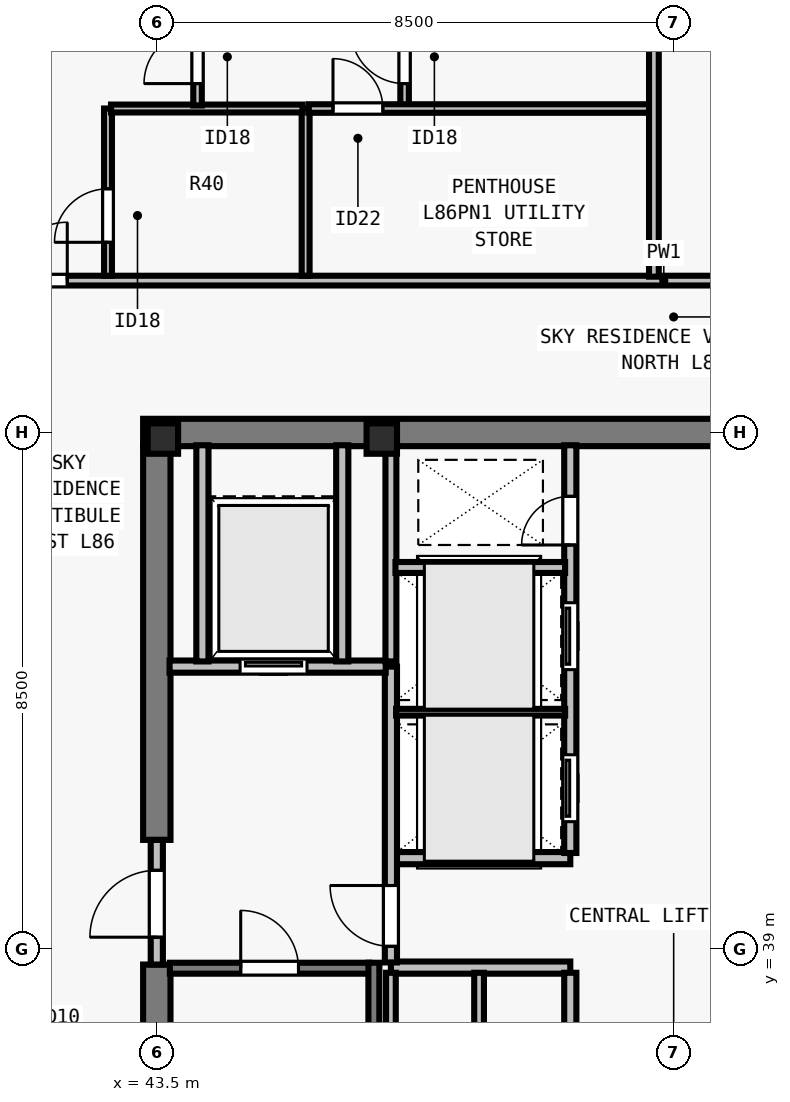
"""IFC4 building model, lengths in metres.
Left out: names, types, materials, properties, quantities, classifications, styles, units other than length and angle.
Written with IfcOpenShell. Run it as: python <this file> out.ifc"""

import sys

from ifc_helpers import new_model, si_unit, direction, frame, frame_2d, origin, origin_2d, place, context, subcontext, project, spatial, rectangle, i_section, extrude, element, fill, save


model = new_model("IFC4")
c1 = context("Model", 3, precision=1e-05, world=origin(), true_north=direction((0.0, 1.0)))
c2 = subcontext(c1, "Body", "Model", "MODEL_VIEW")
j1 = project(units=[si_unit("LENGTHUNIT", "METRE"), si_unit("PLANEANGLEUNIT", "RADIAN")], contexts=[c1])
p1 = place(None, origin())
s1 = spatial("IfcSite", under=j1, at=p1, CompositionType="ELEMENT")
p2 = place(p1, origin())
s2 = spatial("IfcBuilding", under=s1, at=p2, CompositionType="ELEMENT")
p3 = place(p2, frame((0.0, 0.0, 312.0)))
s3 = spatial("IfcBuildingStorey", under=s2, at=p3, CompositionType="ELEMENT", Elevation=312.0)
for number, where, z_axis, x_axis in (
    (1, (43.6, 47.4, 0.0), (0.0, 0.0, 1.0), (1.0, 0.0, 0.0)),
    (2, (47.2, 47.4, 0.0), (0.0, 0.0, 1.0), (1.0, 0.0, 0.0)),
):
    element("IfcColumn", number, at=place(p3, frame(where, z_axis=z_axis, x_axis=x_axis)), inside=s3, PredefinedType="COLUMN", context=c2, shape_type="SweptSolid", body=[
        extrude(i_section(OverallWidth=0.5, OverallDepth=0.5, WebThickness=0.028, FlangeThickness=0.045, at=origin_2d()), origin(), (0.0, 0.0, 1.0), 3.5),
    ])
p4 = place(p3, frame((43.275, 47.5, 0.0), z_axis=(0.0, 0.0, 1.0), x_axis=(1.0, 0.0, 0.0)))
e3 = element("IfcWall", 3, at=p4, inside=s3, PredefinedType="SHEAR", context=c2, shape_type="SweptSolid", body=[
    extrude(rectangle(XDim=17.45, YDim=0.45, at=frame_2d((8.725, 0.0))), origin(), (0.0, 0.0, 1.0), 3.29),
])
p5 = place(p3, frame((43.5, 30.715, 0.0), z_axis=(0.0, 0.0, 1.0), x_axis=(0.0, 1.0, 0.0)))
e4 = element("IfcWall", 4, at=p5, inside=s3, PredefinedType="SHEAR", context=c2, shape_type="SweptSolid", body=[
    extrude(rectangle(XDim=8.035, YDim=0.45, at=frame_2d((4.018, 0.0))), origin(), (0.0, 0.0, 1.0), 3.29),
])
p6 = place(p3, frame((43.5, 40.8, 0.0), z_axis=(0.0, 0.0, 1.0), x_axis=(0.0, 1.0, 0.0)))
e5 = element("IfcWall", 5, at=p6, inside=s3, PredefinedType="SHEAR", context=c2, shape_type="SweptSolid", body=[
    extrude(rectangle(XDim=6.485, YDim=0.45, at=frame_2d((3.242, 0.0))), origin(), (0.0, 0.0, 1.0), 3.29),
])
for number, where, z_axis, x_axis in (
    (6, (47.35, 38.7, 0.0), (0.0, 0.0, 1.0), (1.0, 0.0, 0.0)),
    (7, (47.35, 40.5, 0.0), (0.0, 0.0, 1.0), (1.0, 0.0, 0.0)),
):
    element("IfcWall", number, at=place(p3, frame(where, z_axis=z_axis, x_axis=x_axis)), inside=s3, PredefinedType="SOLIDWALL", context=c2, shape_type="SweptSolid", body=[
        extrude(rectangle(XDim=2.95, YDim=0.2, at=frame_2d((1.475, 0.0))), origin(), (0.0, 0.0, 1.0), 3.29),
    ])
p7 = place(p3, frame((50.3, 30.71, 0.0), z_axis=(0.0, 0.0, 1.0), x_axis=(0.0, 1.0, 0.0)))
e8 = element("IfcWall", 8, at=p7, inside=s3, PredefinedType="SOLIDWALL", context=c2, shape_type="SweptSolid", body=[
    extrude(rectangle(XDim=7.905, YDim=0.2, at=frame_2d((3.953, 0.0))), origin(), (0.0, 0.0, 1.0), 3.29),
])
p8 = place(p7, frame((2.14, 0.0, 0.0)))
e9 = element("IfcOpeningElement", 9, at=p8, cuts=e8, PredefinedType="OPENING", context=c2, shape_type="SweptSolid", body=[
    extrude(rectangle(XDim=0.95, YDim=2.12, at=frame_2d((0.475, 1.06))), frame((0.0, 0.11, 0.0), z_axis=(0.0, -1.0, 0.0), x_axis=(1.0, 0.0, 0.0)), (0.0, 0.0, 1.0), 0.22),
])
p9 = place(p3, frame((50.3, 40.585, 0.0), z_axis=(0.0, 0.0, 1.0), x_axis=(0.0, 1.0, 0.0)))
e10 = element("IfcWall", 10, at=p9, inside=s3, PredefinedType="SOLIDWALL", context=c2, shape_type="SweptSolid", body=[
    extrude(rectangle(XDim=6.705, YDim=0.2, at=frame_2d((3.353, 0.0))), origin(), (0.0, 0.0, 1.0), 3.29),
])
p10 = place(p9, frame((0.515, 0.0, 0.0)))
e11 = element("IfcOpeningElement", 11, at=p10, cuts=e10, PredefinedType="OPENING", context=c2, shape_type="SweptSolid", body=[
    extrude(rectangle(XDim=1.1, YDim=2.2, at=frame_2d((0.55, 1.1))), frame((0.0, 0.11, 0.0), z_axis=(0.0, -1.0, 0.0), x_axis=(1.0, 0.0, 0.0)), (0.0, 0.0, 1.0), 0.22),
])
p11 = place(p9, frame((3.015, 0.0, 0.0)))
e12 = element("IfcOpeningElement", 12, at=p11, cuts=e10, PredefinedType="OPENING", context=c2, shape_type="SweptSolid", body=[
    extrude(rectangle(XDim=1.1, YDim=2.2, at=frame_2d((0.55, 1.1))), frame((0.0, 0.11, 0.0), z_axis=(0.0, -1.0, 0.0), x_axis=(1.0, 0.0, 0.0)), (0.0, 0.0, 1.0), 0.22),
])
p12 = place(p9, frame((5.065, 0.0, 0.0)))
e13 = element("IfcOpeningElement", 13, at=p12, cuts=e10, PredefinedType="OPENING", context=c2, shape_type="SweptSolid", body=[
    extrude(rectangle(XDim=0.8, YDim=2.08, at=frame_2d((0.4, 1.04))), frame((0.0, 0.11, 0.0), z_axis=(0.0, -1.0, 0.0), x_axis=(1.0, 0.0, 0.0)), (0.0, 0.0, 1.0), 0.22),
])
p13 = place(p3, frame((43.5, 38.75, 0.0), z_axis=(0.0, 0.0, 1.0), x_axis=(0.0, 1.0, 0.0)))
e14 = element("IfcWall", 14, at=p13, inside=s3, PredefinedType="SOLIDWALL", context=c2, shape_type="SweptSolid", body=[
    extrude(rectangle(XDim=2.05, YDim=0.2, at=frame_2d((1.025, 0.0))), origin(), (0.0, 0.0, 1.0), 3.29),
])
p14 = place(p13, frame((0.45, 0.0, 0.0)))
e15 = element("IfcOpeningElement", 15, at=p14, cuts=e14, PredefinedType="OPENING", context=c2, shape_type="SweptSolid", body=[
    extrude(rectangle(XDim=1.1, YDim=2.15, at=frame_2d((0.55, 1.075))), frame((0.0, 0.11, 0.0), z_axis=(0.0, -1.0, 0.0), x_axis=(1.0, 0.0, 0.0)), (0.0, 0.0, 1.0), 0.22),
])
p15 = place(p3, frame((47.35, 38.785, 0.0), z_axis=(0.0, 0.0, 1.0), x_axis=(0.0, 1.0, 0.0)))
e16 = element("IfcWall", 16, at=p15, inside=s3, PredefinedType="SOLIDWALL", context=c2, shape_type="SweptSolid", body=[
    extrude(rectangle(XDim=4.865, YDim=0.2, at=frame_2d((2.433, 0.0))), origin(), (0.0, 0.0, 1.0), 3.29),
])
p16 = place(p15, frame((0.265, 0.0, 0.0)))
e17 = element("IfcOpeningElement", 17, at=p16, cuts=e16, PredefinedType="OPENING", context=c2, shape_type="SweptSolid", body=[
    extrude(rectangle(XDim=1.0, YDim=2.15, at=frame_2d((0.5, 1.075))), frame((0.0, 0.11, 0.0), z_axis=(0.0, -1.0, 0.0), x_axis=(1.0, 0.0, 0.0)), (0.0, 0.0, 1.0), 0.22),
])
p17 = place(p3, frame((43.71, 43.65, 0.0), z_axis=(0.0, 0.0, 1.0), x_axis=(1.0, 0.0, 0.0)))
e18 = element("IfcWall", 18, at=p17, inside=s3, PredefinedType="SOLIDWALL", context=c2, shape_type="SweptSolid", body=[
    extrude(rectangle(XDim=3.555, YDim=0.2, at=frame_2d((1.777, 0.0))), origin(), (0.0, 0.0, 1.0), 3.29),
])
p18 = place(p17, frame((1.16, 0.0, 0.0)))
e19 = element("IfcOpeningElement", 19, at=p18, cuts=e18, PredefinedType="OPENING", context=c2, shape_type="SweptSolid", body=[
    extrude(rectangle(XDim=1.1, YDim=2.2, at=frame_2d((0.55, 1.1))), frame((0.0, 0.11, 0.0), z_axis=(0.0, -1.0, 0.0), x_axis=(1.0, 0.0, 0.0)), (0.0, 0.0, 1.0), 0.22),
])
for number, where, z_axis, x_axis in (
    (20, (46.55, 43.735, 0.0), (0.0, 0.0, 1.0), (0.0, 1.0, 0.0)),
    (21, (44.25, 43.735, 0.0), (0.0, 0.0, 1.0), (0.0, 1.0, 0.0)),
):
    element("IfcWall", number, at=place(p3, frame(where, z_axis=z_axis, x_axis=x_axis)), inside=s3, PredefinedType="SOLIDWALL", context=c2, shape_type="SweptSolid", body=[
        extrude(rectangle(XDim=3.555, YDim=0.2, at=frame_2d((1.777, 0.0))), origin(), (0.0, 0.0, 1.0), 3.29),
    ])
p19 = place(p3, frame((47.35, 30.71, 0.0), z_axis=(0.0, 0.0, 1.0), x_axis=(0.0, 1.0, 0.0)))
e22 = element("IfcWall", 22, at=p19, inside=s3, PredefinedType="PARTITIONING", context=c2, shape_type="SweptSolid", body=[
    extrude(rectangle(XDim=7.905, YDim=0.16, at=frame_2d((3.953, 0.0))), origin(), (0.0, 0.0, 1.0), 3.29),
])
p20 = place(p3, frame((48.8, 30.71, 0.0), z_axis=(0.0, 0.0, 1.0), x_axis=(0.0, 1.0, 0.0)))
e23 = element("IfcWall", 23, at=p20, inside=s3, PredefinedType="PARTITIONING", context=c2, shape_type="SweptSolid", body=[
    extrude(rectangle(XDim=7.905, YDim=0.16, at=frame_2d((3.953, 0.0))), origin(), (0.0, 0.0, 1.0), 3.29),
])
p21 = place(p20, frame((3.54, 0.0, 0.0)))
e24 = element("IfcOpeningElement", 24, at=p21, cuts=e23, PredefinedType="OPENING", context=c2, shape_type="SweptSolid", body=[
    extrude(rectangle(XDim=0.85, YDim=2.12, at=frame_2d((0.425, 1.06))), frame((0.0, 0.09, 0.0), z_axis=(0.0, -1.0, 0.0), x_axis=(1.0, 0.0, 0.0)), (0.0, 0.0, 1.0), 0.18),
])
p22 = place(p3, frame((47.35, 43.735, 0.0), z_axis=(0.0, 0.0, 1.0), x_axis=(0.0, 1.0, 0.0)))
e25 = element("IfcWall", 25, at=p22, inside=s3, PredefinedType="SOLIDWALL", context=c2, shape_type="SweptSolid", body=[
    extrude(rectangle(XDim=3.555, YDim=0.18, at=frame_2d((1.777, 0.0))), origin(), (0.0, 0.0, 1.0), 3.29),
])
p23 = place(p3, frame((47.435, 42.9, 0.0), z_axis=(0.0, 0.0, 1.0), x_axis=(1.0, 0.0, 0.0)))
e26 = element("IfcWall", 26, at=p23, inside=s3, PredefinedType="PARTITIONING", context=c2, shape_type="SweptSolid", body=[
    extrude(rectangle(XDim=2.78, YDim=0.11, at=frame_2d((1.39, 0.0))), origin(), (0.0, 0.0, 1.0), 3.29),
])
p24 = place(p3, frame((47.425, 45.28, 0.0), z_axis=(0.0, 0.0, 1.0), x_axis=(1.0, 0.0, 0.0)))
e27 = element("IfcWall", 27, at=p24, inside=s3, PredefinedType="SOLIDWALL", context=c2, shape_type="SweptSolid", body=[
    extrude(rectangle(XDim=2.79, YDim=0.18, at=frame_2d((1.395, 0.0))), origin(), (0.0, 0.0, 1.0), 3.29),
])
p25 = place(p3, frame((31.285, 49.998, 0.0), z_axis=(0.0, 0.0, 1.0), x_axis=(1.0, 0.0, 0.0)))
e28 = element("IfcWall", 28, at=p25, inside=s3, PredefinedType="PARTITIONING", context=c2, shape_type="SweptSolid", body=[
    extrude(rectangle(XDim=38.975, YDim=0.16, at=frame_2d((19.488, 0.0))), origin(), (0.0, 0.0, 1.0), 3.009),
])
p26 = place(p25, frame((9.782, 0.0, 0.0)))
e29 = element("IfcOpeningElement", 29, at=p26, cuts=e28, PredefinedType="OPENING", context=c2, shape_type="SweptSolid", body=[
    extrude(rectangle(XDim=0.96, YDim=2.18, at=frame_2d((0.48, 1.09))), frame((0.0, 0.09, 0.0), z_axis=(0.0, -1.0, 0.0), x_axis=(1.0, 0.0, 0.0)), (0.0, 0.0, 1.0), 0.18),
])
p27 = place(p25, frame((30.363, 0.0, 0.0)))
e30 = element("IfcOpeningElement", 30, at=p27, cuts=e28, PredefinedType="OPENING", context=c2, shape_type="SweptSolid", body=[
    extrude(rectangle(XDim=0.96, YDim=2.18, at=frame_2d((0.48, 1.09))), frame((0.0, 0.09, 0.0), z_axis=(0.0, -1.0, 0.0), x_axis=(1.0, 0.0, 0.0)), (0.0, 0.0, 1.0), 0.18),
])
p28 = place(p3, frame((45.948, 50.077, 0.0), z_axis=(0.0, 0.0, 1.0), x_axis=(0.0, 1.0, 0.0)))
e31 = element("IfcWall", 31, at=p28, inside=s3, PredefinedType="PLUMBINGWALL", context=c2, shape_type="SweptSolid", body=[
    extrude(rectangle(XDim=2.75, YDim=0.13, at=frame_2d((1.375, 0.0))), origin(), (0.0, 0.0, 1.0), 3.29),
])
p29 = place(p3, frame((42.698, 50.077, 0.0), z_axis=(0.0, 0.0, 1.0), x_axis=(0.0, 1.0, 0.0)))
e32 = element("IfcWall", 32, at=p29, inside=s3, PredefinedType="PLUMBINGWALL", context=c2, shape_type="SweptSolid", body=[
    extrude(rectangle(XDim=2.75, YDim=0.13, at=frame_2d((1.375, 0.0))), origin(), (0.0, 0.0, 1.0), 3.29),
])
p30 = place(p29, frame((0.55, 0.0, 0.0)))
e33 = element("IfcOpeningElement", 33, at=p30, cuts=e32, PredefinedType="OPENING", context=c2, shape_type="SweptSolid", body=[
    extrude(rectangle(XDim=0.88, YDim=2.1, at=frame_2d((0.44, 1.05))), frame((0.0, 0.075, 0.0), z_axis=(0.0, -1.0, 0.0), x_axis=(1.0, 0.0, 0.0)), (0.0, 0.0, 1.0), 0.15),
])
p31 = place(p3, frame((42.748, 52.827, 0.0), z_axis=(0.0, 0.0, 1.0), x_axis=(1.0, 0.0, 0.0)))
e34 = element("IfcWall", 34, at=p31, inside=s3, PredefinedType="PLUMBINGWALL", context=c2, shape_type="SweptSolid", body=[
    extrude(rectangle(XDim=3.15, YDim=0.13, at=frame_2d((1.575, 0.0))), origin(), (0.0, 0.0, 1.0), 3.29),
])
p32 = place(p3, frame((47.575, 52.788, 0.0), z_axis=(0.0, 0.0, 1.0), x_axis=(0.0, 1.0, 0.0)))
e35 = element("IfcWall", 35, at=p32, inside=s3, PredefinedType="PARTITIONING", context=c2, shape_type="SweptSolid", body=[
    extrude(rectangle(XDim=6.833, YDim=0.14, at=frame_2d((3.416, 0.0))), origin(), (0.0, 0.0, 1.0), 3.29),
])
p33 = place(p32, frame((0.45, 0.0, 0.0)))
e36 = element("IfcOpeningElement", 36, at=p33, cuts=e35, PredefinedType="OPENING", context=c2, shape_type="SweptSolid", body=[
    extrude(rectangle(XDim=0.88, YDim=2.1, at=frame_2d((0.44, 1.05))), frame((0.0, 0.08, 0.0), z_axis=(0.0, -1.0, 0.0), x_axis=(1.0, 0.0, 0.0)), (0.0, 0.0, 1.0), 0.16),
])
p34 = place(p3, frame((45.998, 52.827, 0.0), z_axis=(0.0, 0.0, 1.0), x_axis=(1.0, 0.0, 0.0)))
e37 = element("IfcWall", 37, at=p34, inside=s3, PredefinedType="PARTITIONING", context=c2, shape_type="SweptSolid", body=[
    extrude(rectangle(XDim=5.728, YDim=0.14, at=frame_2d((2.864, 0.0))), origin(), (0.0, 0.0, 1.0), 3.29),
])
p35 = place(p34, frame((0.4, 0.0, 0.0)))
e38 = element("IfcOpeningElement", 38, at=p35, cuts=e37, PredefinedType="OPENING", context=c2, shape_type="SweptSolid", body=[
    extrude(rectangle(XDim=0.82, YDim=2.1, at=frame_2d((0.41, 1.05))), frame((0.0, 0.08, 0.0), z_axis=(0.0, -1.0, 0.0), x_axis=(1.0, 0.0, 0.0)), (0.0, 0.0, 1.0), 0.16),
])
p36 = place(p3, frame((44.17, 52.877, 0.0), z_axis=(0.0, 0.0, 1.0), x_axis=(0.0, 1.0, 0.0)))
e39 = element("IfcWall", 39, at=p36, inside=s3, PredefinedType="PARTITIONING", context=c2, shape_type="SweptSolid", body=[
    extrude(rectangle(XDim=6.743, YDim=0.14, at=frame_2d((3.371, 0.0))), origin(), (0.0, 0.0, 1.0), 3.29),
])
p37 = place(p36, frame((0.36, 0.0, 0.0)))
e40 = element("IfcOpeningElement", 40, at=p37, cuts=e39, PredefinedType="OPENING", context=c2, shape_type="SweptSolid", body=[
    extrude(rectangle(XDim=0.88, YDim=2.1, at=frame_2d((0.44, 1.05))), frame((0.0, 0.08, 0.0), z_axis=(0.0, -1.0, 0.0), x_axis=(1.0, 0.0, 0.0)), (0.0, 0.0, 1.0), 0.16),
])
p38 = place(p3, frame((51.675, 50.062, 0.0), z_axis=(0.0, 0.0, 1.0), x_axis=(0.0, 1.0, 0.0)))
e41 = element("IfcWall", 41, at=p38, inside=s3, PredefinedType="PARTITIONING", context=c2, shape_type="SweptSolid", body=[
    extrude(rectangle(XDim=9.653, YDim=0.16, at=frame_2d((4.826, 0.0))), origin(), (0.0, 0.0, 1.0), 3.009),
])
p39 = place(p3, frame((43.715, 38.69, 0.0), z_axis=(0.0, 0.0, 1.0), x_axis=(1.0, 0.0, 0.0)))
e42 = element("IfcWall", 42, at=p39, inside=s3, PredefinedType="SOLIDWALL", context=c2, shape_type="SweptSolid", body=[
    extrude(rectangle(XDim=3.28, YDim=0.18, at=frame_2d((1.64, 0.0))), origin(), (0.0, 0.0, 1.0), 3.29),
])
p40 = place(p39, frame((1.165, 0.0, 0.0)))
e43 = element("IfcOpeningElement", 43, at=p40, cuts=e42, PredefinedType="OPENING", context=c2, shape_type="SweptSolid", body=[
    extrude(rectangle(XDim=0.95, YDim=2.15, at=frame_2d((0.475, 1.075))), frame((0.0, 0.1, 0.0), z_axis=(0.0, -1.0, 0.0), x_axis=(1.0, 0.0, 0.0)), (0.0, 0.0, 1.0), 0.2),
])
p41 = place(p3, frame((47.07, 38.78, 0.0), z_axis=(0.0, 0.0, 1.0), x_axis=(0.0, -1.0, 0.0)))
e44 = element("IfcWall", 44, at=p41, inside=s3, PredefinedType="SOLIDWALL", context=c2, shape_type="SweptSolid", body=[
    extrude(rectangle(XDim=8.067, YDim=0.18, at=frame_2d((4.034, 0.0))), origin(), (0.0, 0.0, 1.0), 3.29),
])
p42 = place(p14, origin())
e45 = element("IfcDoor", 45, at=p42, inside=s3, OperationType="SINGLE_SWING_LEFT", PredefinedType="DOOR", context=c2, shape_type="SweptSolid", body=[
    extrude(rectangle(XDim=1.1, YDim=2.15, at=frame_2d((0.55, 1.075))), frame((0.0, 0.025, 0.0), z_axis=(0.0, -1.0, 0.0), x_axis=(1.0, 0.0, 0.0)), (0.0, 0.0, 1.0), 0.05),
])
fill(e15, e45)
p43 = place(p16, origin())
e46 = element("IfcDoor", 46, at=p43, inside=s3, OperationType="SINGLE_SWING_RIGHT", PredefinedType="DOOR", context=c2, shape_type="SweptSolid", body=[
    extrude(rectangle(XDim=1.0, YDim=2.15, at=frame_2d((0.5, 1.075))), frame((0.0, 0.025, 0.0), z_axis=(0.0, -1.0, 0.0), x_axis=(1.0, 0.0, 0.0)), (0.0, 0.0, 1.0), 0.05),
])
fill(e17, e46)
p44 = place(p18, origin())
e47 = element("IfcDoor", 47, at=p44, inside=s3, OperationType="SLIDING_TO_LEFT", PredefinedType="DOOR", context=c2, shape_type="SweptSolid", body=[
    extrude(rectangle(XDim=1.1, YDim=2.2, at=frame_2d((0.55, 1.1))), frame((0.0, 0.025, 0.0), z_axis=(0.0, -1.0, 0.0), x_axis=(1.0, 0.0, 0.0)), (0.0, 0.0, 1.0), 0.05),
])
fill(e19, e47)
p45 = place(p10, origin())
e48 = element("IfcDoor", 48, at=p45, inside=s3, OperationType="SLIDING_TO_LEFT", PredefinedType="DOOR", context=c2, shape_type="SweptSolid", body=[
    extrude(rectangle(XDim=1.1, YDim=2.2, at=frame_2d((0.55, 1.1))), frame((0.0, 0.025, 0.0), z_axis=(0.0, -1.0, 0.0), x_axis=(1.0, 0.0, 0.0)), (0.0, 0.0, 1.0), 0.05),
])
fill(e11, e48)
p46 = place(p11, origin())
e49 = element("IfcDoor", 49, at=p46, inside=s3, OperationType="SLIDING_TO_LEFT", PredefinedType="DOOR", context=c2, shape_type="SweptSolid", body=[
    extrude(rectangle(XDim=1.1, YDim=2.2, at=frame_2d((0.55, 1.1))), frame((0.0, 0.025, 0.0), z_axis=(0.0, -1.0, 0.0), x_axis=(1.0, 0.0, 0.0)), (0.0, 0.0, 1.0), 0.05),
])
fill(e12, e49)
p47 = place(p12, origin())
e50 = element("IfcDoor", 50, at=p47, inside=s3, OperationType="SINGLE_SWING_LEFT", PredefinedType="DOOR", context=c2, shape_type="SweptSolid", body=[
    extrude(rectangle(XDim=0.8, YDim=2.08, at=frame_2d((0.4, 1.04))), frame((0.0, 0.025, 0.0), z_axis=(0.0, -1.0, 0.0), x_axis=(1.0, 0.0, 0.0)), (0.0, 0.0, 1.0), 0.05),
])
fill(e13, e50)
p48 = place(p30, origin())
e51 = element("IfcDoor", 51, at=p48, inside=s3, OperationType="SINGLE_SWING_LEFT", PredefinedType="DOOR", context=c2, shape_type="SweptSolid", body=[
    extrude(rectangle(XDim=0.88, YDim=2.1, at=frame_2d((0.44, 1.05))), frame((0.0, 0.025, 0.0), z_axis=(0.0, -1.0, 0.0), x_axis=(1.0, 0.0, 0.0)), (0.0, 0.0, 1.0), 0.05),
])
fill(e33, e51)
p49 = place(p35, origin())
e52 = element("IfcDoor", 52, at=p49, inside=s3, OperationType="SINGLE_SWING_LEFT", PredefinedType="DOOR", context=c2, shape_type="SweptSolid", body=[
    extrude(rectangle(XDim=0.82, YDim=2.1, at=frame_2d((0.41, 1.05))), frame((0.0, 0.025, 0.0), z_axis=(0.0, -1.0, 0.0), x_axis=(1.0, 0.0, 0.0)), (0.0, 0.0, 1.0), 0.05),
])
fill(e38, e52)
p50 = place(p33, origin())
e53 = element("IfcDoor", 53, at=p50, inside=s3, OperationType="SINGLE_SWING_RIGHT", PredefinedType="DOOR", context=c2, shape_type="SweptSolid", body=[
    extrude(rectangle(XDim=0.88, YDim=2.1, at=frame_2d((0.44, 1.05))), frame((0.0, 0.025, 0.0), z_axis=(0.0, -1.0, 0.0), x_axis=(1.0, 0.0, 0.0)), (0.0, 0.0, 1.0), 0.05),
])
fill(e36, e53)
p51 = place(p37, origin())
e54 = element("IfcDoor", 54, at=p51, inside=s3, OperationType="SINGLE_SWING_LEFT", PredefinedType="DOOR", context=c2, shape_type="SweptSolid", body=[
    extrude(rectangle(XDim=0.88, YDim=2.1, at=frame_2d((0.44, 1.05))), frame((0.0, 0.025, 0.0), z_axis=(0.0, -1.0, 0.0), x_axis=(1.0, 0.0, 0.0)), (0.0, 0.0, 1.0), 0.05),
])
fill(e40, e54)
p52 = place(p26, origin())
e55 = element("IfcDoor", 55, at=p52, inside=s3, OperationType="SINGLE_SWING_RIGHT", PredefinedType="DOOR", context=c2, shape_type="SweptSolid", body=[
    extrude(rectangle(XDim=0.96, YDim=2.18, at=frame_2d((0.48, 1.09))), frame((0.0, 0.025, 0.0), z_axis=(0.0, -1.0, 0.0), x_axis=(1.0, 0.0, 0.0)), (0.0, 0.0, 1.0), 0.05),
])
fill(e29, e55)
p53 = place(p40, origin())
e56 = element("IfcDoor", 56, at=p53, inside=s3, OperationType="SINGLE_SWING_LEFT", PredefinedType="DOOR", context=c2, shape_type="SweptSolid", body=[
    extrude(rectangle(XDim=0.95, YDim=2.15, at=frame_2d((0.475, 1.075))), frame((0.0, 0.025, 0.0), z_axis=(0.0, -1.0, 0.0), x_axis=(1.0, 0.0, 0.0)), (0.0, 0.0, 1.0), 0.05),
])
fill(e43, e56)
save(model, sys.argv[1])
